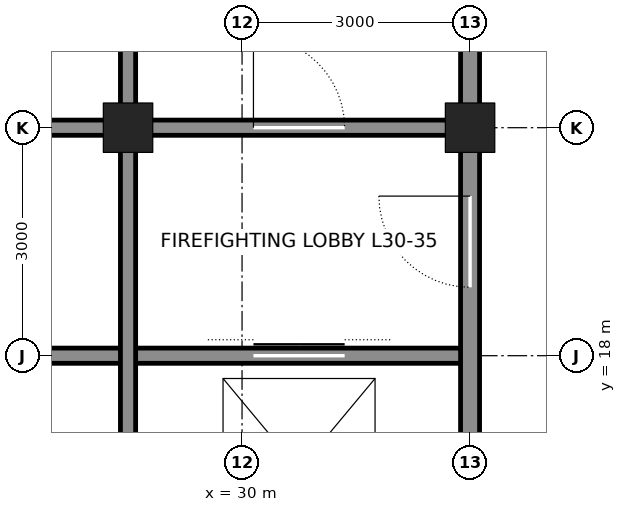
"""IFC4 building model, lengths in metres.
Left out: names, types, materials, properties, quantities, classifications, styles, units other than length and angle.
Written with IfcOpenShell. Run it as: python <this file> out.ifc"""

import sys

from ifc_helpers import new_model, si_unit, direction, frame, frame_2d, origin, origin_2d, place, context, subcontext, project, spatial, rectangle, hollow_rectangle, extrude, element, fill, save


model = new_model("IFC4")
c1 = context("Model", 3, precision=1e-05, world=origin(), true_north=direction((0.0, 1.0)))
c2 = subcontext(c1, "Body", "Model", "MODEL_VIEW")
j1 = project(units=[si_unit("LENGTHUNIT", "METRE"), si_unit("PLANEANGLEUNIT", "RADIAN")], contexts=[c1])
p1 = place(None, origin())
s1 = spatial("IfcSite", under=j1, at=p1, CompositionType="ELEMENT")
p2 = place(p1, origin())
s2 = spatial("IfcBuilding", under=s1, at=p2, CompositionType="ELEMENT")
p3 = place(p2, frame((0.0, 0.0, 140.4)))
s3 = spatial("IfcBuildingStorey", under=s2, at=p3, CompositionType="ELEMENT", Elevation=140.4)
for number, where, z_axis, x_axis in (
    (1, (33.0, 21.0, 0.0), (0.0, 0.0, 1.0), (1.0, 0.0, 0.0)),
    (2, (28.5, 21.0, 0.0), (0.0, 0.0, 1.0), (1.0, 0.0, 0.0)),
):
    element("IfcColumn", number, at=place(p3, frame(where, z_axis=z_axis, x_axis=x_axis)), inside=s3, PredefinedType="COLUMN", context=c2, shape_type="SweptSolid", body=[
        extrude(hollow_rectangle(XDim=0.65, YDim=0.65, WallThickness=0.065, at=origin_2d()), origin(), (0.0, 0.0, 1.0), 4.2),
    ])
p4 = place(p3, frame((25.5, 18.0, 0.0), z_axis=(0.0, 0.0, 1.0), x_axis=(1.0, 0.0, 0.0)))
e3 = element("IfcWall", 3, at=p4, inside=s3, PredefinedType="SOLIDWALL", context=c2, shape_type="SweptSolid", body=[
    extrude(rectangle(XDim=7.5, YDim=0.2, at=frame_2d((3.75, 0.0))), origin(), (0.0, 0.0, 1.0), 4.04),
])
p5 = place(p4, frame((4.65, 0.0, 0.0)))
e4 = element("IfcOpeningElement", 4, at=p5, cuts=e3, PredefinedType="OPENING", context=c2, shape_type="SweptSolid", body=[
    extrude(rectangle(XDim=1.2, YDim=2.1, at=frame_2d((0.6, 1.05))), frame((0.0, 0.11, 0.0), z_axis=(0.0, -1.0, 0.0), x_axis=(1.0, 0.0, 0.0)), (0.0, 0.0, 1.0), 0.22),
])
p6 = place(p3, frame((25.5, 21.0, 0.0), z_axis=(0.0, 0.0, 1.0), x_axis=(1.0, 0.0, 0.0)))
e5 = element("IfcWall", 5, at=p6, inside=s3, PredefinedType="SOLIDWALL", context=c2, shape_type="SweptSolid", body=[
    extrude(rectangle(XDim=2.75, YDim=0.2, at=frame_2d((1.375, 0.0))), origin(), (0.0, 0.0, 1.0), 3.09),
])
p7 = place(p3, frame((28.75, 21.0, 0.0), z_axis=(0.0, 0.0, 1.0), x_axis=(1.0, 0.0, 0.0)))
e6 = element("IfcWall", 6, at=p7, inside=s3, PredefinedType="SOLIDWALL", context=c2, shape_type="SweptSolid", body=[
    extrude(rectangle(XDim=4.0, YDim=0.2, at=frame_2d((2.0, 0.0))), origin(), (0.0, 0.0, 1.0), 3.09),
])
p8 = place(p7, frame((1.4, 0.0, 0.0)))
e7 = element("IfcOpeningElement", 7, at=p8, cuts=e6, PredefinedType="OPENING", context=c2, shape_type="SweptSolid", body=[
    extrude(rectangle(XDim=1.2, YDim=2.1, at=frame_2d((0.6, 1.05))), frame((0.0, 0.11, 0.0), z_axis=(0.0, -1.0, 0.0), x_axis=(1.0, 0.0, 0.0)), (0.0, 0.0, 1.0), 0.22),
])
p9 = place(p3, frame((28.5, 12.25, 0.0), z_axis=(0.0, 0.0, 1.0), x_axis=(0.0, 1.0, 0.0)))
e8 = element("IfcWall", 8, at=p9, inside=s3, PredefinedType="SOLIDWALL", context=c2, shape_type="SweptSolid", body=[
    extrude(rectangle(XDim=8.5, YDim=0.2, at=frame_2d((4.25, 0.0))), origin(), (0.0, 0.0, 1.0), 3.113),
])
p10 = place(p3, frame((28.5, 21.25, 0.0), z_axis=(0.0, 0.0, 1.0), x_axis=(0.0, 1.0, 0.0)))
e9 = element("IfcWall", 9, at=p10, inside=s3, PredefinedType="SOLIDWALL", context=c2, shape_type="SweptSolid", body=[
    extrude(rectangle(XDim=2.5, YDim=0.2, at=frame_2d((1.25, 0.0))), origin(), (0.0, 0.0, 1.0), 3.113),
])
p11 = place(p3, frame((33.0, 12.25, 0.0), z_axis=(0.0, 0.0, 1.0), x_axis=(0.0, 1.0, 0.0)))
e10 = element("IfcWall", 10, at=p11, inside=s3, PredefinedType="SOLIDWALL", context=c2, shape_type="SweptSolid", body=[
    extrude(rectangle(XDim=8.5, YDim=0.25, at=frame_2d((4.25, 0.0))), origin(), (0.0, 0.0, 1.0), 3.113),
])
p12 = place(p11, frame((6.65, 0.0, 0.0)))
e11 = element("IfcOpeningElement", 11, at=p12, cuts=e10, PredefinedType="OPENING", context=c2, shape_type="SweptSolid", body=[
    extrude(rectangle(XDim=1.2, YDim=2.1, at=frame_2d((0.6, 1.05))), frame((0.0, 0.135, 0.0), z_axis=(0.0, -1.0, 0.0), x_axis=(1.0, 0.0, 0.0)), (0.0, 0.0, 1.0), 0.27),
])
p13 = place(p11, frame((0.875, 0.0, 0.0)))
e12 = element("IfcOpeningElement", 12, at=p13, cuts=e10, PredefinedType="OPENING", context=c2, shape_type="SweptSolid", body=[
    extrude(rectangle(XDim=0.75, YDim=2.1, at=frame_2d((0.375, 1.05))), frame((0.0, 0.135, 0.0), z_axis=(0.0, -1.0, 0.0), x_axis=(1.0, 0.0, 0.0)), (0.0, 0.0, 1.0), 0.27),
])
p14 = place(p3, frame((33.0, 21.25, 0.0), z_axis=(0.0, 0.0, 1.0), x_axis=(0.0, 1.0, 0.0)))
e13 = element("IfcWall", 13, at=p14, inside=s3, PredefinedType="SOLIDWALL", context=c2, shape_type="SweptSolid", body=[
    extrude(rectangle(XDim=2.5, YDim=0.25, at=frame_2d((1.25, 0.0))), origin(), (0.0, 0.0, 1.0), 3.113),
])
p15 = place(p8, origin())
e14 = element("IfcDoor", 14, at=p15, inside=s3, OperationType="SINGLE_SWING_LEFT", PredefinedType="DOOR", context=c2, shape_type="SweptSolid", body=[
    extrude(rectangle(XDim=1.2, YDim=2.1, at=frame_2d((0.6, 1.05))), frame((0.0, 0.025, 0.0), z_axis=(0.0, -1.0, 0.0), x_axis=(1.0, 0.0, 0.0)), (0.0, 0.0, 1.0), 0.05),
])
fill(e7, e14)
p16 = place(p12, origin())
e15 = element("IfcDoor", 15, at=p16, inside=s3, OperationType="SINGLE_SWING_RIGHT", PredefinedType="DOOR", context=c2, shape_type="SweptSolid", body=[
    extrude(rectangle(XDim=1.2, YDim=2.1, at=frame_2d((0.6, 1.05))), frame((0.0, 0.025, 0.0), z_axis=(0.0, -1.0, 0.0), x_axis=(1.0, 0.0, 0.0)), (0.0, 0.0, 1.0), 0.05),
])
fill(e11, e15)
p17 = place(p5, origin())
e16 = element("IfcDoor", 16, at=p17, inside=s3, OperationType="DOUBLE_DOOR_SLIDING", PredefinedType="DOOR", context=c2, shape_type="SweptSolid", body=[
    extrude(rectangle(XDim=1.2, YDim=2.1, at=frame_2d((0.6, 1.05))), frame((0.0, 0.025, 0.0), z_axis=(0.0, -1.0, 0.0), x_axis=(1.0, 0.0, 0.0)), (0.0, 0.0, 1.0), 0.05),
])
fill(e4, e16)
save(model, sys.argv[1])
